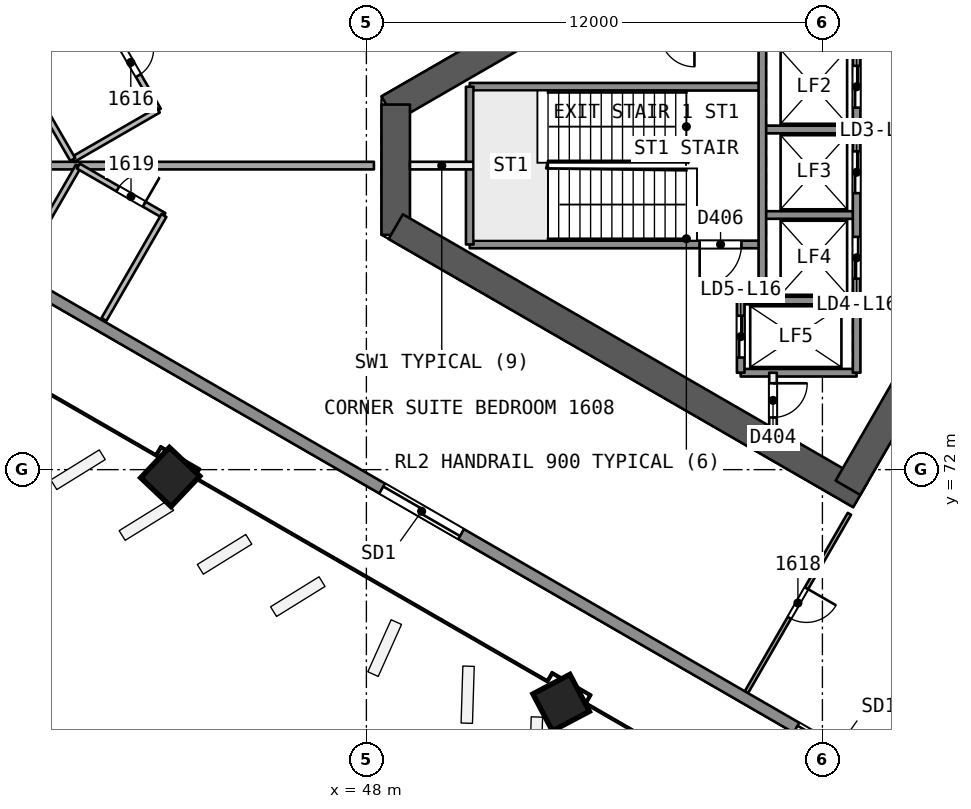
"""IFC4 building model, lengths in metres.
Left out: names, types, materials, properties, quantities, classifications, styles, units other than length and angle.
Written with IfcOpenShell. Run it as: python <this file> out.ifc"""

import sys

from ifc_helpers import new_model, si_unit, direction, frame, frame_2d, origin, origin_2d, place, context, subcontext, project, spatial, rectangle, extrude, element, fill, save


model = new_model("IFC4")
c1 = context("Model", 3, precision=1e-05, world=origin(), true_north=direction((0.0, 1.0)))
c2 = subcontext(c1, "Body", "Model", "MODEL_VIEW")
j1 = project(units=[si_unit("LENGTHUNIT", "METRE"), si_unit("PLANEANGLEUNIT", "RADIAN")], contexts=[c1])
p1 = place(None, origin())
s1 = spatial("IfcSite", under=j1, at=p1, CompositionType="ELEMENT")
p2 = place(p1, origin())
s2 = spatial("IfcBuilding", under=s1, at=p2, CompositionType="ELEMENT")
p3 = place(p2, frame((0.0, 0.0, 72.1)))
s3 = spatial("IfcBuildingStorey", under=s2, at=p3, CompositionType="ELEMENT", Elevation=72.1)
p4 = place(p3, frame((65.567, 80.0, 0.0), z_axis=(0.0, 0.0, 1.0), x_axis=(-0.499988615364, 0.866031976607, 0.0)))
e1 = element("IfcWall", 1, at=p4, inside=s3, PredefinedType="SHEAR", context=c2, shape_type="SweptSolid", body=[
    extrude(rectangle(XDim=10.163, YDim=0.75, at=frame_2d((5.082, 0.0))), origin(), (0.0, 0.0, 1.0), 3.7),
])
p5 = place(p4, frame((0.733, 0.0, 0.0)))
e2 = element("IfcOpeningElement", 2, at=p5, cuts=e1, PredefinedType="OPENING", context=c2, shape_type="SweptSolid", body=[
    extrude(rectangle(XDim=1.2, YDim=2.1, at=frame_2d((0.6, 1.05))), frame((0.0, 0.385, 0.0), z_axis=(0.0, -1.0, 0.0), x_axis=(1.0, 0.0, 0.0)), (0.0, 0.0, 1.0), 0.771),
])
p6 = place(p3, frame((60.673, 88.477, 0.0), z_axis=(0.0, 0.0, 1.0), x_axis=(-0.8660248072, -0.500001033313, 0.0)))
e3 = element("IfcWall", 3, at=p6, inside=s3, PredefinedType="SHEAR", context=c2, shape_type="SweptSolid", body=[
    extrude(rectangle(XDim=13.958, YDim=0.75, at=frame_2d((6.979, 0.0))), origin(), (0.0, 0.0, 1.0), 3.7),
])
p7 = place(p3, frame((48.772, 81.606, 0.0), z_axis=(0.0, 0.0, 1.0), x_axis=(0.0, -1.0, 0.0)))
e4 = element("IfcWall", 4, at=p7, inside=s3, PredefinedType="SHEAR", context=c2, shape_type="SweptSolid", body=[
    extrude(rectangle(XDim=3.429, YDim=0.75, at=frame_2d((1.714, 0.0))), origin(), (0.0, 0.0, 1.0), 3.7),
])
p8 = place(p3, frame((48.772, 78.394, 0.0), z_axis=(0.0, 0.0, 1.0), x_axis=(0.866028339916, -0.499994914436, 0.0)))
e5 = element("IfcWall", 5, at=p8, inside=s3, PredefinedType="SHEAR", context=c2, shape_type="SweptSolid", body=[
    extrude(rectangle(XDim=14.117, YDim=0.75, at=frame_2d((7.059, 0.0))), origin(), (0.0, 0.0, 1.0), 3.7),
])
p9 = place(p3, frame((60.673, 71.523, 0.0), z_axis=(0.0, 0.0, 1.0), x_axis=(0.499997052475, 0.866027105532, 0.0)))
e6 = element("IfcWall", 6, at=p9, inside=s3, PredefinedType="SHEAR", context=c2, shape_type="SweptSolid", body=[
    extrude(rectangle(XDim=10.005, YDim=0.75, at=frame_2d((5.002, 0.0))), origin(), (0.0, 0.0, 1.0), 3.7),
])
p10 = place(p9, frame((7.855, 0.0, 0.0)))
e7 = element("IfcOpeningElement", 7, at=p10, cuts=e6, PredefinedType="OPENING", context=c2, shape_type="SweptSolid", body=[
    extrude(rectangle(XDim=1.2, YDim=2.1, at=frame_2d((0.6, 1.05))), frame((0.0, 0.385, 0.0), z_axis=(0.0, -1.0, 0.0), x_axis=(1.0, 0.0, 0.0)), (0.0, 0.0, 1.0), 0.771),
])
p11 = place(p3, frame((42.804, 71.799, 0.0), z_axis=(0.02855911485, 0.006793507689, 0.999569019734), x_axis=(-0.865318766308, 0.500768301983, 0.021319953197)))
e8 = element("IfcColumn", 8, at=p11, inside=s3, PredefinedType="COLUMN", context=c2, shape_type="SweptSolid", body=[
    extrude(rectangle(XDim=1.1, YDim=1.1, at=origin_2d()), origin(), (0.0, 0.0, 1.0), 3.702),
])
p12 = place(p3, frame((53.102, 65.854, 0.0), z_axis=(0.019328516974, 0.012138044789, 0.999739504221), x_axis=(-0.865689041461, 0.500468616527, 0.010660551878)))
e9 = element("IfcColumn", 9, at=p12, inside=s3, PredefinedType="COLUMN", context=c2, shape_type="SweptSolid", body=[
    extrude(rectangle(XDim=1.1, YDim=1.1, at=origin_2d()), origin(), (0.0, 0.0, 1.0), 3.701),
])
p13 = place(p3, frame((41.046, 84.022, 0.0), z_axis=(0.0, 0.0, 1.0), x_axis=(0.500017718492, -0.866015173767, 0.0)))
e10 = element("IfcWall", 10, at=p13, inside=s3, PredefinedType="PARTITIONING", context=c2, shape_type="SweptSolid", body=[
    extrude(rectangle(XDim=2.958, YDim=0.15, at=frame_2d((1.479, 0.0))), origin(), (0.0, 0.0, 1.0), 3.2),
])
p14 = place(p13, frame((1.108, 0.0, 0.0)))
e11 = element("IfcOpeningElement", 11, at=p14, cuts=e10, PredefinedType="OPENING", context=c2, shape_type="SweptSolid", body=[
    extrude(rectangle(XDim=0.8, YDim=2.1, at=frame_2d((0.4, 1.05))), frame((0.0, 0.085, 0.0), z_axis=(0.0, -1.0, 0.0), x_axis=(1.0, 0.0, 0.0)), (0.0, 0.0, 1.0), 0.171),
])
p15 = place(p3, frame((42.525, 81.46, 0.0), z_axis=(0.0, 0.0, 1.0), x_axis=(-0.866021400173, -0.500006934395, 0.0)))
e12 = element("IfcWall", 12, at=p15, inside=s3, PredefinedType="PARTITIONING", context=c2, shape_type="SweptSolid", body=[
    extrude(rectangle(XDim=2.6, YDim=0.15, at=frame_2d((1.3, 0.0))), origin(), (0.0, 0.0, 1.0), 3.2),
])
p16 = place(p3, frame((40.273, 80.16, 0.0), z_axis=(0.0, 0.0, 1.0), x_axis=(-0.500013365158, 0.86601768727, 0.0)))
e13 = element("IfcWall", 13, at=p16, inside=s3, PredefinedType="PARTITIONING", context=c2, shape_type="SweptSolid", body=[
    extrude(rectangle(XDim=2.325, YDim=0.15, at=frame_2d((1.162, 0.0))), origin(), (0.0, 0.0, 1.0), 3.2),
])
p17 = place(p3, frame((39.111, 80.0, 0.0), z_axis=(0.0, 0.0, 1.0), x_axis=(1.0, 0.0, 0.0)))
e14 = element("IfcWall", 14, at=p17, inside=s3, PredefinedType="PARTITIONING", context=c2, shape_type="SweptSolid", body=[
    extrude(rectangle(XDim=9.087, YDim=0.2, at=frame_2d((4.543, 0.0))), origin(), (0.0, 0.0, 1.0), 3.2),
])
p18 = place(p3, frame((60.71, 70.838, 0.0), z_axis=(0.0, 0.0, 1.0), x_axis=(-0.499974500895, -0.866040125199, 0.0)))
e15 = element("IfcWall", 15, at=p18, inside=s3, PredefinedType="PARTITIONING", context=c2, shape_type="SweptSolid", body=[
    extrude(rectangle(XDim=5.422, YDim=0.1, at=frame_2d((2.711, 0.0))), origin(), (0.0, 0.0, 1.0), 3.2),
])
p19 = place(p18, frame((2.261, 0.0, 0.0)))
e16 = element("IfcOpeningElement", 16, at=p19, cuts=e15, PredefinedType="OPENING", context=c2, shape_type="SweptSolid", body=[
    extrude(rectangle(XDim=0.9, YDim=2.1, at=frame_2d((0.45, 1.05))), frame((0.0, 0.061, 0.0), z_axis=(0.0, -1.0, 0.0), x_axis=(1.0, 0.0, 0.0)), (0.0, 0.0, 1.0), 0.121),
])
p20 = place(p3, frame((39.111, 77.718, 0.0), z_axis=(0.0, 0.0, 1.0), x_axis=(0.500058625179, 0.865991553875, 0.0)))
e17 = element("IfcWall", 17, at=p20, inside=s3, PredefinedType="PARTITIONING", context=c2, shape_type="SweptSolid", body=[
    extrude(rectangle(XDim=2.619, YDim=0.15, at=frame_2d((1.31, 0.0))), origin(), (0.0, 0.0, 1.0), 3.2),
])
p21 = place(p3, frame((40.421, 79.986, 0.0), z_axis=(0.0, 0.0, 1.0), x_axis=(0.86603858612, -0.49997716683, 0.0)))
e18 = element("IfcWall", 18, at=p21, inside=s3, PredefinedType="PARTITIONING", context=c2, shape_type="SweptSolid", body=[
    extrude(rectangle(XDim=2.6, YDim=0.15, at=frame_2d((1.3, 0.0))), origin(), (0.0, 0.0, 1.0), 3.2),
])
p22 = place(p21, frame((1.2, 0.0, 0.0)))
e19 = element("IfcOpeningElement", 19, at=p22, cuts=e18, PredefinedType="OPENING", context=c2, shape_type="SweptSolid", body=[
    extrude(rectangle(XDim=0.8, YDim=2.1, at=frame_2d((0.4, 1.05))), frame((0.0, 0.085, 0.0), z_axis=(0.0, -1.0, 0.0), x_axis=(1.0, 0.0, 0.0)), (0.0, 0.0, 1.0), 0.171),
])
p23 = place(p3, frame((42.672, 78.686, 0.0), z_axis=(0.0, 0.0, 1.0), x_axis=(-0.499963336192, -0.866046570609, 0.0)))
e20 = element("IfcWall", 20, at=p23, inside=s3, PredefinedType="PARTITIONING", context=c2, shape_type="SweptSolid", body=[
    extrude(rectangle(XDim=3.158, YDim=0.15, at=frame_2d((1.579, 0.0))), origin(), (0.0, 0.0, 1.0), 3.2),
])
p24 = place(p3, frame((38.962, 83.038, 0.0), z_axis=(0.0, 0.0, 1.0), x_axis=(0.866024483997, 0.500001593116, 0.0)))
e21 = element("IfcWall", 21, at=p24, inside=s3, PredefinedType="SOLIDWALL", context=c2, shape_type="SweptSolid", body=[
    extrude(rectangle(XDim=59.381, YDim=0.3, at=frame_2d((29.69, 0.0))), origin(), (0.0, 0.0, 1.0), 3.2),
])
p25 = place(p24, frame((27.399, 0.0, 0.0)))
e22 = element("IfcOpeningElement", 22, at=p25, cuts=e21, PredefinedType="OPENING", context=c2, shape_type="SweptSolid", body=[
    extrude(rectangle(XDim=2.4, YDim=2.4, at=frame_2d((1.2, 1.2))), frame((0.0, 0.161, 0.0), z_axis=(0.0, -1.0, 0.0), x_axis=(1.0, 0.0, 0.0)), (0.0, 0.0, 1.0), 0.321),
])
p26 = place(p24, frame((22.723, 0.0, 0.0)))
e23 = element("IfcOpeningElement", 23, at=p26, cuts=e21, PredefinedType="OPENING", context=c2, shape_type="SweptSolid", body=[
    extrude(rectangle(XDim=2.4, YDim=2.4, at=frame_2d((1.2, 1.2))), frame((0.0, 0.161, 0.0), z_axis=(0.0, -1.0, 0.0), x_axis=(1.0, 0.0, 0.0)), (0.0, 0.0, 1.0), 0.321),
])
p27 = place(p24, frame((10.887, 0.0, 0.0)))
e24 = element("IfcOpeningElement", 24, at=p27, cuts=e21, PredefinedType="OPENING", context=c2, shape_type="SweptSolid", body=[
    extrude(rectangle(XDim=2.4, YDim=2.4, at=frame_2d((1.2, 1.2))), frame((0.0, 0.161, 0.0), z_axis=(0.0, -1.0, 0.0), x_axis=(1.0, 0.0, 0.0)), (0.0, 0.0, 1.0), 0.321),
])
p28 = place(p24, frame((44.158, 0.0, 0.0)))
e25 = element("IfcOpeningElement", 25, at=p28, cuts=e21, PredefinedType="OPENING", context=c2, shape_type="SweptSolid", body=[
    extrude(rectangle(XDim=2.4, YDim=2.4, at=frame_2d((1.2, 1.2))), frame((0.0, 0.161, 0.0), z_axis=(0.0, -1.0, 0.0), x_axis=(1.0, 0.0, 0.0)), (0.0, 0.0, 1.0), 0.321),
])
p29 = place(p3, frame((90.388, 47.271, 0.0), z_axis=(0.0, 0.0, 1.0), x_axis=(-0.866024483997, 0.500001593116, 0.0)))
e26 = element("IfcWall", 26, at=p29, inside=s3, PredefinedType="SOLIDWALL", context=c2, shape_type="SweptSolid", body=[
    extrude(rectangle(XDim=59.381, YDim=0.3, at=frame_2d((29.69, 0.0))), origin(), (0.0, 0.0, 1.0), 3.2),
])
p30 = place(p29, frame((28.802, 0.0, 0.0)))
e27 = element("IfcOpeningElement", 27, at=p30, cuts=e26, PredefinedType="OPENING", context=c2, shape_type="SweptSolid", body=[
    extrude(rectangle(XDim=2.4, YDim=2.4, at=frame_2d((1.2, 1.2))), frame((0.0, 0.161, 0.0), z_axis=(0.0, -1.0, 0.0), x_axis=(1.0, 0.0, 0.0)), (0.0, 0.0, 1.0), 0.321),
])
p31 = place(p29, frame((33.479, 0.0, 0.0)))
e28 = element("IfcOpeningElement", 28, at=p31, cuts=e26, PredefinedType="OPENING", context=c2, shape_type="SweptSolid", body=[
    extrude(rectangle(XDim=2.4, YDim=2.4, at=frame_2d((1.2, 1.2))), frame((0.0, 0.161, 0.0), z_axis=(0.0, -1.0, 0.0), x_axis=(1.0, 0.0, 0.0)), (0.0, 0.0, 1.0), 0.321),
])
p32 = place(p29, frame((46.066, 0.0, 0.0)))
e29 = element("IfcOpeningElement", 29, at=p32, cuts=e26, PredefinedType="OPENING", context=c2, shape_type="SweptSolid", body=[
    extrude(rectangle(XDim=2.4, YDim=2.4, at=frame_2d((1.2, 1.2))), frame((0.0, 0.161, 0.0), z_axis=(0.0, -1.0, 0.0), x_axis=(1.0, 0.0, 0.0)), (0.0, 0.0, 1.0), 0.321),
])
p33 = place(p29, frame((12.823, 0.0, 0.0)))
e30 = element("IfcOpeningElement", 30, at=p33, cuts=e26, PredefinedType="OPENING", context=c2, shape_type="SweptSolid", body=[
    extrude(rectangle(XDim=2.4, YDim=2.4, at=frame_2d((1.2, 1.2))), frame((0.0, 0.161, 0.0), z_axis=(0.0, -1.0, 0.0), x_axis=(1.0, 0.0, 0.0)), (0.0, 0.0, 1.0), 0.321),
])
p34 = place(p3, frame((58.42, 82.075, 0.0), z_axis=(0.0, 0.0, 1.0), x_axis=(-1.0, 0.0, 0.0)))
e31 = element("IfcWall", 31, at=p34, inside=s3, PredefinedType="SOLIDWALL", context=c2, shape_type="SweptSolid", body=[
    extrude(rectangle(XDim=7.7, YDim=0.2, at=frame_2d((3.85, 0.0))), origin(), (0.0, 0.0, 1.0), 3.2),
])
p35 = place(p3, frame((60.9, 80.95, 0.0), z_axis=(0.0, 0.0, 1.0), x_axis=(-1.0, 0.0, 0.0)))
e32 = element("IfcWall", 32, at=p35, inside=s3, PredefinedType="SOLIDWALL", context=c2, shape_type="SweptSolid", body=[
    extrude(rectangle(XDim=2.48, YDim=0.2, at=frame_2d((1.24, 0.0))), origin(), (0.0, 0.0, 1.0), 3.2),
])
p36 = place(p3, frame((50.82, 80.0, 0.0), z_axis=(0.0, 0.0, 1.0), x_axis=(-1.0, 0.0, 0.0)))
e33 = element("IfcWall", 33, at=p36, inside=s3, PredefinedType="PARTITIONING", context=c2, shape_type="SweptSolid", body=[
    extrude(rectangle(XDim=1.673, YDim=0.2, at=frame_2d((0.836, 0.0))), origin(), (0.0, 0.0, 1.0), 3.2),
])
p37 = place(p3, frame((60.9, 78.7, 0.0), z_axis=(0.0, 0.0, 1.0), x_axis=(-1.0, 0.0, 0.0)))
e34 = element("IfcWall", 34, at=p37, inside=s3, PredefinedType="SOLIDWALL", context=c2, shape_type="SweptSolid", body=[
    extrude(rectangle(XDim=2.48, YDim=0.2, at=frame_2d((1.24, 0.0))), origin(), (0.0, 0.0, 1.0), 3.2),
])
p38 = place(p3, frame((58.42, 77.925, 0.0), z_axis=(0.0, 0.0, 1.0), x_axis=(-1.0, 0.0, 0.0)))
e35 = element("IfcWall", 35, at=p38, inside=s3, PredefinedType="SOLIDWALL", context=c2, shape_type="SweptSolid", body=[
    extrude(rectangle(XDim=7.7, YDim=0.2, at=frame_2d((3.85, 0.0))), origin(), (0.0, 0.0, 1.0), 3.2),
])
p39 = place(p38, frame((0.55, 0.0, 0.0)))
e36 = element("IfcOpeningElement", 36, at=p39, cuts=e35, PredefinedType="OPENING", context=c2, shape_type="SweptSolid", body=[
    extrude(rectangle(XDim=1.1, YDim=2.1, at=frame_2d((0.55, 1.05))), frame((0.0, 0.11, 0.0), z_axis=(0.0, -1.0, 0.0), x_axis=(1.0, 0.0, 0.0)), (0.0, 0.0, 1.0), 0.221),
])
for number, where, z_axis, x_axis in (
    (37, (60.9, 76.45, 0.0), (0.0, 0.0, 1.0), (-1.0, 0.0, 0.0)),
    (38, (60.9, 74.55, 0.0), (0.0, 0.0, 1.0), (-1.0, 0.0, 0.0)),
):
    element("IfcWall", number, at=place(p3, frame(where, z_axis=z_axis, x_axis=x_axis)), inside=s3, PredefinedType="SOLIDWALL", context=c2, shape_type="SweptSolid", body=[
        extrude(rectangle(XDim=3.05, YDim=0.2, at=frame_2d((1.525, 0.0))), origin(), (0.0, 0.0, 1.0), 3.2),
    ])
p40 = place(p3, frame((60.9, 85.45, 0.0), z_axis=(0.0, 0.0, 1.0), x_axis=(0.0, -1.0, 0.0)))
e39 = element("IfcWall", 39, at=p40, inside=s3, PredefinedType="SOLIDWALL", context=c2, shape_type="SweptSolid", body=[
    extrude(rectangle(XDim=10.9, YDim=0.2, at=frame_2d((5.45, 0.0))), origin(), (0.0, 0.0, 1.0), 3.2),
])
p41 = place(p40, frame((0.575, 0.0, 0.0)))
e40 = element("IfcOpeningElement", 40, at=p41, cuts=e39, PredefinedType="OPENING", context=c2, shape_type="SweptSolid", body=[
    extrude(rectangle(XDim=1.1, YDim=2.1, at=frame_2d((0.55, 1.05))), frame((0.0, 0.11, 0.0), z_axis=(0.0, -1.0, 0.0), x_axis=(1.0, 0.0, 0.0)), (0.0, 0.0, 1.0), 0.221),
])
p42 = place(p40, frame((2.825, 0.0, 0.0)))
e41 = element("IfcOpeningElement", 41, at=p42, cuts=e39, PredefinedType="OPENING", context=c2, shape_type="SweptSolid", body=[
    extrude(rectangle(XDim=1.1, YDim=2.1, at=frame_2d((0.55, 1.05))), frame((0.0, 0.11, 0.0), z_axis=(0.0, -1.0, 0.0), x_axis=(1.0, 0.0, 0.0)), (0.0, 0.0, 1.0), 0.221),
])
p43 = place(p40, frame((5.075, 0.0, 0.0)))
e42 = element("IfcOpeningElement", 42, at=p43, cuts=e39, PredefinedType="OPENING", context=c2, shape_type="SweptSolid", body=[
    extrude(rectangle(XDim=1.1, YDim=2.1, at=frame_2d((0.55, 1.05))), frame((0.0, 0.11, 0.0), z_axis=(0.0, -1.0, 0.0), x_axis=(1.0, 0.0, 0.0)), (0.0, 0.0, 1.0), 0.221),
])
p44 = place(p40, frame((7.325, 0.0, 0.0)))
e43 = element("IfcOpeningElement", 43, at=p44, cuts=e39, PredefinedType="OPENING", context=c2, shape_type="SweptSolid", body=[
    extrude(rectangle(XDim=1.1, YDim=2.1, at=frame_2d((0.55, 1.05))), frame((0.0, 0.11, 0.0), z_axis=(0.0, -1.0, 0.0), x_axis=(1.0, 0.0, 0.0)), (0.0, 0.0, 1.0), 0.221),
])
p45 = place(p3, frame((58.7, 74.55, 0.0), z_axis=(0.0, 0.0, 1.0), x_axis=(0.0, -1.0, 0.0)))
e44 = element("IfcWall", 44, at=p45, inside=s3, PredefinedType="PARTITIONING", context=c2, shape_type="SweptSolid", body=[
    extrude(rectangle(XDim=1.455, YDim=0.2, at=frame_2d((0.728, 0.0))), origin(), (0.0, 0.0, 1.0), 3.2),
])
p46 = place(p45, frame((0.278, 0.0, 0.0)))
e45 = element("IfcOpeningElement", 45, at=p46, cuts=e44, PredefinedType="OPENING", context=c2, shape_type="SweptSolid", body=[
    extrude(rectangle(XDim=0.9, YDim=2.1, at=frame_2d((0.45, 1.05))), frame((0.0, 0.11, 0.0), z_axis=(0.0, -1.0, 0.0), x_axis=(1.0, 0.0, 0.0)), (0.0, 0.0, 1.0), 0.221),
])
p47 = place(p3, frame((58.42, 85.45, 0.0), z_axis=(0.0, 0.0, 1.0), x_axis=(0.0, -1.0, 0.0)))
e46 = element("IfcWall", 46, at=p47, inside=s3, PredefinedType="SOLIDWALL", context=c2, shape_type="SweptSolid", body=[
    extrude(rectangle(XDim=9.0, YDim=0.2, at=frame_2d((4.5, 0.0))), origin(), (0.0, 0.0, 1.0), 3.2),
])
p48 = place(p3, frame((57.85, 76.45, 0.0), z_axis=(0.0, 0.0, 1.0), x_axis=(0.0, -1.0, 0.0)))
e47 = element("IfcWall", 47, at=p48, inside=s3, PredefinedType="SOLIDWALL", context=c2, shape_type="SweptSolid", body=[
    extrude(rectangle(XDim=1.9, YDim=0.2, at=frame_2d((0.95, 0.0))), origin(), (0.0, 0.0, 1.0), 3.2),
])
p49 = place(p48, frame((0.4, 0.0, 0.0)))
e48 = element("IfcOpeningElement", 48, at=p49, cuts=e47, PredefinedType="OPENING", context=c2, shape_type="SweptSolid", body=[
    extrude(rectangle(XDim=1.1, YDim=2.1, at=frame_2d((0.55, 1.05))), frame((0.0, 0.11, 0.0), z_axis=(0.0, -1.0, 0.0), x_axis=(1.0, 0.0, 0.0)), (0.0, 0.0, 1.0), 0.221),
])
p50 = place(p3, frame((50.72, 82.075, 0.0), z_axis=(0.0, 0.0, 1.0), x_axis=(0.0, -1.0, 0.0)))
e49 = element("IfcWall", 49, at=p50, inside=s3, PredefinedType="SOLIDWALL", context=c2, shape_type="SweptSolid", body=[
    extrude(rectangle(XDim=4.15, YDim=0.2, at=frame_2d((2.075, 0.0))), origin(), (0.0, 0.0, 1.0), 3.2),
])
p51 = place(p14, origin())
e50 = element("IfcDoor", 50, at=p51, inside=s3, OperationType="SINGLE_SWING_LEFT", PredefinedType="NOTDEFINED", context=c2, shape_type="SweptSolid", body=[
    extrude(rectangle(XDim=0.8, YDim=2.1, at=frame_2d((0.4, 1.05))), frame((0.0, 0.025, 0.0), z_axis=(0.0, -1.0, 0.0), x_axis=(1.0, 0.0, 0.0)), (0.0, 0.0, 1.0), 0.05),
])
fill(e11, e50)
p52 = place(p19, origin())
e51 = element("IfcDoor", 51, at=p52, inside=s3, OperationType="SINGLE_SWING_LEFT", PredefinedType="NOTDEFINED", context=c2, shape_type="SweptSolid", body=[
    extrude(rectangle(XDim=0.9, YDim=2.1, at=frame_2d((0.45, 1.05))), frame((0.0, 0.025, 0.0), z_axis=(0.0, -1.0, 0.0), x_axis=(1.0, 0.0, 0.0)), (0.0, 0.0, 1.0), 0.05),
])
fill(e16, e51)
p53 = place(p22, origin())
e52 = element("IfcDoor", 52, at=p53, inside=s3, OperationType="SINGLE_SWING_RIGHT", PredefinedType="NOTDEFINED", context=c2, shape_type="SweptSolid", body=[
    extrude(rectangle(XDim=0.8, YDim=2.1, at=frame_2d((0.4, 1.05))), frame((0.0, 0.025, 0.0), z_axis=(0.0, -1.0, 0.0), x_axis=(1.0, 0.0, 0.0)), (0.0, 0.0, 1.0), 0.05),
])
fill(e19, e52)
p54 = place(p31, origin())
e53 = element("IfcDoor", 53, at=p54, inside=s3, OperationType="SLIDING_TO_RIGHT", PredefinedType="NOTDEFINED", context=c2, shape_type="SweptSolid", body=[
    extrude(rectangle(XDim=2.4, YDim=2.4, at=frame_2d((1.2, 1.2))), frame((0.0, 0.025, 0.0), z_axis=(0.0, -1.0, 0.0), x_axis=(1.0, 0.0, 0.0)), (0.0, 0.0, 1.0), 0.05),
])
fill(e28, e53)
p55 = place(p32, origin())
e54 = element("IfcDoor", 54, at=p55, inside=s3, OperationType="SLIDING_TO_LEFT", PredefinedType="NOTDEFINED", context=c2, shape_type="SweptSolid", body=[
    extrude(rectangle(XDim=2.4, YDim=2.4, at=frame_2d((1.2, 1.2))), frame((0.0, 0.025, 0.0), z_axis=(0.0, -1.0, 0.0), x_axis=(1.0, 0.0, 0.0)), (0.0, 0.0, 1.0), 0.05),
])
fill(e29, e54)
p56 = place(p42, origin())
e55 = element("IfcDoor", 55, at=p56, inside=s3, OperationType="SLIDING_TO_LEFT", PredefinedType="NOTDEFINED", context=c2, shape_type="SweptSolid", body=[
    extrude(rectangle(XDim=1.1, YDim=2.1, at=frame_2d((0.55, 1.05))), frame((0.0, 0.025, 0.0), z_axis=(0.0, -1.0, 0.0), x_axis=(1.0, 0.0, 0.0)), (0.0, 0.0, 1.0), 0.05),
])
fill(e41, e55)
p57 = place(p43, origin())
e56 = element("IfcDoor", 56, at=p57, inside=s3, OperationType="SLIDING_TO_RIGHT", PredefinedType="NOTDEFINED", context=c2, shape_type="SweptSolid", body=[
    extrude(rectangle(XDim=1.1, YDim=2.1, at=frame_2d((0.55, 1.05))), frame((0.0, 0.025, 0.0), z_axis=(0.0, -1.0, 0.0), x_axis=(1.0, 0.0, 0.0)), (0.0, 0.0, 1.0), 0.05),
])
fill(e42, e56)
p58 = place(p44, origin())
e57 = element("IfcDoor", 57, at=p58, inside=s3, OperationType="SLIDING_TO_LEFT", PredefinedType="NOTDEFINED", context=c2, shape_type="SweptSolid", body=[
    extrude(rectangle(XDim=1.1, YDim=2.1, at=frame_2d((0.55, 1.05))), frame((0.0, 0.025, 0.0), z_axis=(0.0, -1.0, 0.0), x_axis=(1.0, 0.0, 0.0)), (0.0, 0.0, 1.0), 0.05),
])
fill(e43, e57)
p59 = place(p49, origin())
e58 = element("IfcDoor", 58, at=p59, inside=s3, OperationType="SLIDING_TO_RIGHT", PredefinedType="NOTDEFINED", context=c2, shape_type="SweptSolid", body=[
    extrude(rectangle(XDim=1.1, YDim=2.1, at=frame_2d((0.55, 1.05))), frame((0.0, 0.025, 0.0), z_axis=(0.0, -1.0, 0.0), x_axis=(1.0, 0.0, 0.0)), (0.0, 0.0, 1.0), 0.05),
])
fill(e48, e58)
p60 = place(p46, origin())
e59 = element("IfcDoor", 59, at=p60, inside=s3, OperationType="SINGLE_SWING_LEFT", PredefinedType="NOTDEFINED", context=c2, shape_type="SweptSolid", body=[
    extrude(rectangle(XDim=0.9, YDim=2.1, at=frame_2d((0.45, 1.05))), frame((0.0, 0.025, 0.0), z_axis=(0.0, -1.0, 0.0), x_axis=(1.0, 0.0, 0.0)), (0.0, 0.0, 1.0), 0.05),
])
fill(e45, e59)
p61 = place(p39, origin())
e60 = element("IfcDoor", 60, at=p61, inside=s3, OperationType="SINGLE_SWING_RIGHT", PredefinedType="NOTDEFINED", context=c2, shape_type="SweptSolid", body=[
    extrude(rectangle(XDim=1.1, YDim=2.1, at=frame_2d((0.55, 1.05))), frame((0.0, 0.025, 0.0), z_axis=(0.0, -1.0, 0.0), x_axis=(1.0, 0.0, 0.0)), (0.0, 0.0, 1.0), 0.05),
])
fill(e36, e60)
save(model, sys.argv[1])
